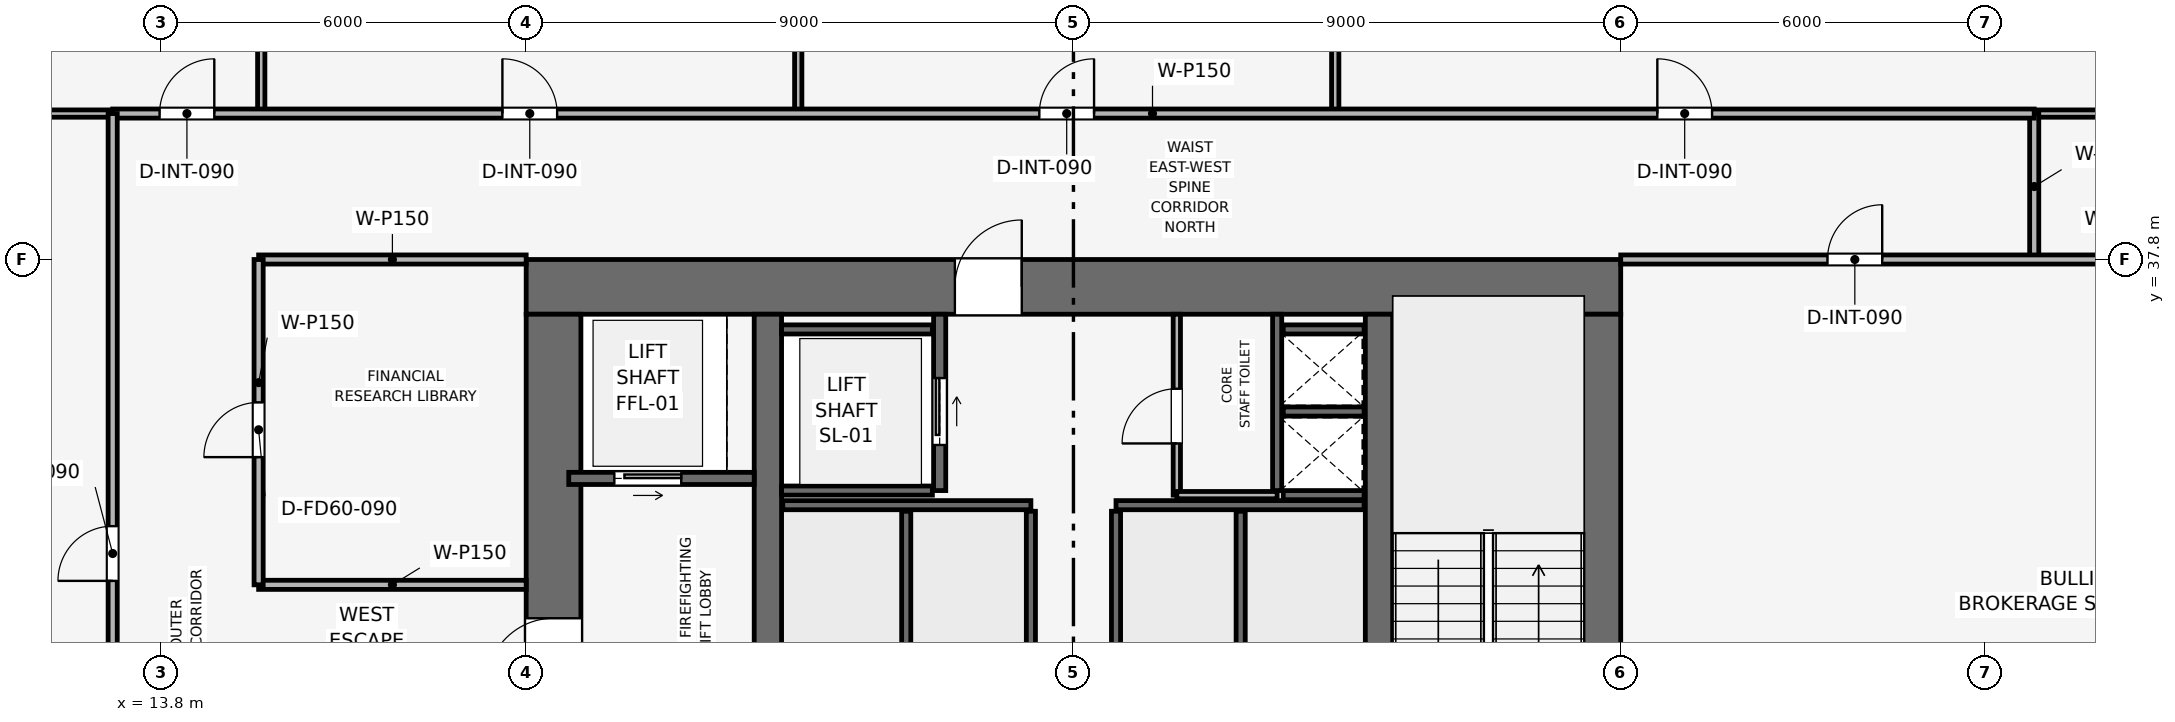
"""IFC4 building model, lengths in metres.
Left out: names, types, materials, properties, quantities, classifications, styles, units other than length and angle.
Written with IfcOpenShell. Run it as: python <this file> out.ifc"""

import sys

from ifc_helpers import new_model, si_unit, direction, frame, frame_2d, origin, place, context, subcontext, project, spatial, rectangle, extrude, element, fill, save


model = new_model("IFC4")
c1 = context("Model", 3, precision=1e-05, world=origin(), true_north=direction((0.0, 1.0)))
c2 = subcontext(c1, "Body", "Model", "MODEL_VIEW")
j1 = project(units=[si_unit("LENGTHUNIT", "METRE"), si_unit("PLANEANGLEUNIT", "RADIAN")], contexts=[c1])
p1 = place(None, origin())
s1 = spatial("IfcSite", under=j1, at=p1, CompositionType="ELEMENT")
p2 = place(p1, origin())
s2 = spatial("IfcBuilding", under=s1, at=p2, CompositionType="ELEMENT")
p3 = place(p2, frame((0.0, 0.0, 183.3)))
s3 = spatial("IfcBuildingStorey", under=s2, at=p3, CompositionType="ELEMENT", Elevation=183.3)
p4 = place(p3, frame((19.8, 37.35, 0.0), z_axis=(0.0, 0.0, 1.0), x_axis=(1.0, 0.0, 0.0)))
e1 = element("IfcWall", 1, at=p4, inside=s3, PredefinedType="SHEAR", context=c2, shape_type="SweptSolid", body=[
    extrude(rectangle(XDim=18.0, YDim=0.9, at=frame_2d((9.0, 0.0))), origin(), (0.0, 0.0, 1.0), 3.75),
])
p5 = place(p4, frame((7.05, 0.0, 0.0)))
e2 = element("IfcOpeningElement", 2, at=p5, cuts=e1, PredefinedType="OPENING", context=c2, shape_type="SweptSolid", body=[
    extrude(rectangle(XDim=1.1, YDim=2.15, at=frame_2d((0.55, 1.075))), frame((0.0, 0.46, 0.0), z_axis=(0.0, -1.0, 0.0), x_axis=(1.0, 0.0, 0.0)), (0.0, 0.0, 1.0), 0.92),
])
p6 = place(p3, frame((20.25, 20.7, 0.0), z_axis=(0.0, 0.0, 1.0), x_axis=(0.0, 1.0, 0.0)))
e3 = element("IfcWall", 3, at=p6, inside=s3, PredefinedType="SHEAR", context=c2, shape_type="SweptSolid", body=[
    extrude(rectangle(XDim=16.2, YDim=0.9, at=frame_2d((8.1, 0.0))), origin(), (0.0, 0.0, 1.0), 3.75),
])
p7 = place(p6, frame((10.1, 0.0, 0.0)))
e4 = element("IfcOpeningElement", 4, at=p7, cuts=e3, PredefinedType="OPENING", context=c2, shape_type="SweptSolid", body=[
    extrude(rectangle(XDim=1.1, YDim=2.15, at=frame_2d((0.55, 1.075))), frame((0.0, 0.46, 0.0), z_axis=(0.0, -1.0, 0.0), x_axis=(1.0, 0.0, 0.0)), (0.0, 0.0, 1.0), 0.92),
])
p8 = place(p3, frame((37.35, 20.7, 0.0), z_axis=(0.0, 0.0, 1.0), x_axis=(0.0, 1.0, 0.0)))
e5 = element("IfcWall", 5, at=p8, inside=s3, PredefinedType="SHEAR", context=c2, shape_type="SweptSolid", body=[
    extrude(rectangle(XDim=16.2, YDim=0.9, at=frame_2d((8.1, 0.0))), origin(), (0.0, 0.0, 1.0), 3.75),
])
p9 = place(p8, frame((4.6, 0.0, 0.0)))
e6 = element("IfcOpeningElement", 6, at=p9, cuts=e5, PredefinedType="OPENING", context=c2, shape_type="SweptSolid", body=[
    extrude(rectangle(XDim=1.1, YDim=2.15, at=frame_2d((0.55, 1.075))), frame((0.0, 0.46, 0.0), z_axis=(0.0, -1.0, 0.0), x_axis=(1.0, 0.0, 0.0)), (0.0, 0.0, 1.0), 0.92),
])
for number, where, z_axis, x_axis in (
    (7, (23.775, 20.7, 0.0), (0.0, 0.0, 1.0), (0.0, 1.0, 0.0)),
    (8, (33.825, 20.7, 0.0), (0.0, 0.0, 1.0), (0.0, 1.0, 0.0)),
):
    element("IfcWall", number, at=place(p3, frame(where, z_axis=z_axis, x_axis=x_axis)), inside=s3, PredefinedType="SHEAR", context=c2, shape_type="SweptSolid", body=[
        extrude(rectangle(XDim=16.2, YDim=0.45, at=frame_2d((8.1, 0.0))), origin(), (0.0, 0.0, 1.0), 3.75),
    ])
p10 = place(p3, frame((32.15, 34.0, 0.0), z_axis=(0.0, 0.0, 1.0), x_axis=(0.0, 1.0, 0.0)))
e9 = element("IfcWall", 9, at=p10, inside=s3, PredefinedType="SHEAR", context=c2, shape_type="SweptSolid", body=[
    extrude(rectangle(XDim=2.9, YDim=0.15, at=frame_2d((1.45, 0.0))), origin(), (0.0, 0.0, 1.0), 3.495),
])
for number, where, z_axis, x_axis in (
    (10, (32.25, 33.925, 0.0), (0.0, 0.0, 1.0), (1.0, 0.0, 0.0)),
    (11, (32.25, 35.3, 0.0), (0.0, 0.0, 1.0), (1.0, 0.0, 0.0)),
):
    element("IfcWall", number, at=place(p3, frame(where, z_axis=z_axis, x_axis=x_axis)), inside=s3, PredefinedType="SHEAR", context=c2, shape_type="SweptSolid", body=[
        extrude(rectangle(XDim=1.33, YDim=0.15, at=frame_2d((0.665, 0.0))), origin(), (0.0, 0.0, 1.0), 3.495),
    ])
p11 = place(p3, frame((20.5, 34.2, 0.0), z_axis=(0.0, 0.0, 1.0), x_axis=(1.0, 0.0, 0.0)))
e12 = element("IfcWall", 12, at=p11, inside=s3, PredefinedType="SHEAR", context=c2, shape_type="SweptSolid", body=[
    extrude(rectangle(XDim=3.05, YDim=0.2, at=frame_2d((1.525, 0.0))), origin(), (0.0, 0.0, 1.0), 3.495),
])
p12 = place(p11, frame((0.75, 0.0, 0.0)))
e13 = element("IfcOpeningElement", 13, at=p12, cuts=e12, PredefinedType="OPENING", context=c2, shape_type="SweptSolid", body=[
    extrude(rectangle(XDim=1.1, YDim=2.15, at=frame_2d((0.55, 1.075))), frame((0.0, 0.11, 0.0), z_axis=(0.0, -1.0, 0.0), x_axis=(1.0, 0.0, 0.0)), (0.0, 0.0, 1.0), 0.22),
])
p13 = place(p3, frame((26.6, 34.0, 0.0), z_axis=(0.0, 0.0, 1.0), x_axis=(0.0, 1.0, 0.0)))
e14 = element("IfcWall", 14, at=p13, inside=s3, PredefinedType="SHEAR", context=c2, shape_type="SweptSolid", body=[
    extrude(rectangle(XDim=2.9, YDim=0.2, at=frame_2d((1.45, 0.0))), origin(), (0.0, 0.0, 1.0), 3.495),
])
p14 = place(p13, frame((0.75, 0.0, 0.0)))
e15 = element("IfcOpeningElement", 15, at=p14, cuts=e14, PredefinedType="OPENING", context=c2, shape_type="SweptSolid", body=[
    extrude(rectangle(XDim=1.1, YDim=2.15, at=frame_2d((0.55, 1.075))), frame((0.0, 0.11, 0.0), z_axis=(0.0, -1.0, 0.0), x_axis=(1.0, 0.0, 0.0)), (0.0, 0.0, 1.0), 0.22),
])
for number, where, z_axis, x_axis in (
    (16, (24.0, 34.0, 0.0), (0.0, 0.0, 1.0), (1.0, 0.0, 0.0)),
    (17, (24.0, 36.65, 0.0), (0.0, 0.0, 1.0), (1.0, 0.0, 0.0)),
):
    element("IfcWall", number, at=place(p3, frame(where, z_axis=z_axis, x_axis=x_axis)), inside=s3, PredefinedType="SHEAR", context=c2, shape_type="SweptSolid", body=[
        extrude(rectangle(XDim=2.48, YDim=0.15, at=frame_2d((1.24, 0.0))), origin(), (0.0, 0.0, 1.0), 3.495),
    ])
p15 = place(p3, frame((32.25, 36.65, 0.0), z_axis=(0.0, 0.0, 1.0), x_axis=(1.0, 0.0, 0.0)))
e18 = element("IfcWall", 18, at=p15, inside=s3, PredefinedType="SHEAR", context=c2, shape_type="SweptSolid", body=[
    extrude(rectangle(XDim=1.33, YDim=0.15, at=frame_2d((0.665, 0.0))), origin(), (0.0, 0.0, 1.0), 3.495),
])
for number, where, z_axis, x_axis in (
    (19, (24.02, 33.76, 0.0), (0.0, 0.0, 1.0), (1.0, 0.0, 0.0)),
    (20, (29.5, 33.76, 0.0), (0.0, 0.0, 1.0), (1.0, 0.0, 0.0)),
):
    element("IfcWall", number, at=place(p3, frame(where, z_axis=z_axis, x_axis=x_axis)), inside=s3, PredefinedType="SHEAR", context=c2, shape_type="SweptSolid", body=[
        extrude(rectangle(XDim=4.08, YDim=0.15, at=frame_2d((2.04, 0.0))), origin(), (0.0, 0.0, 1.0), 3.495),
    ])
for number, where, z_axis, x_axis in (
    (21, (26.05, 31.42, 0.0), (0.0, 0.0, 1.0), (0.0, 1.0, 0.0)),
    (22, (28.1, 31.42, 0.0), (0.0, 0.0, 1.0), (0.0, 1.0, 0.0)),
    (23, (29.5, 31.42, 0.0), (0.0, 0.0, 1.0), (0.0, 1.0, 0.0)),
    (24, (31.55, 31.42, 0.0), (0.0, 0.0, 1.0), (0.0, 1.0, 0.0)),
):
    element("IfcWall", number, at=place(p3, frame(where, z_axis=z_axis, x_axis=x_axis)), inside=s3, PredefinedType="SHEAR", context=c2, shape_type="SweptSolid", body=[
        extrude(rectangle(XDim=2.24, YDim=0.15, at=frame_2d((1.12, 0.0))), origin(), (0.0, 0.0, 1.0), 3.495),
    ])
p16 = place(p3, frame((30.5, 33.925, 0.0), z_axis=(0.0, 0.0, 1.0), x_axis=(0.0, 1.0, 0.0)))
e25 = element("IfcWall", 25, at=p16, inside=s3, PredefinedType="PARTITIONING", context=c2, shape_type="SweptSolid", body=[
    extrude(rectangle(XDim=2.975, YDim=0.12, at=frame_2d((1.487, 0.0))), origin(), (0.0, 0.0, 1.0), 3.495),
])
p17 = place(p16, frame((0.85, 0.0, 0.0)))
e26 = element("IfcOpeningElement", 26, at=p17, cuts=e25, PredefinedType="OPENING", context=c2, shape_type="SweptSolid", body=[
    extrude(rectangle(XDim=0.9, YDim=2.1, at=frame_2d((0.45, 1.05))), frame((0.0, 0.07, 0.0), z_axis=(0.0, -1.0, 0.0), x_axis=(1.0, 0.0, 0.0)), (0.0, 0.0, 1.0), 0.14),
])
p18 = place(p3, frame((30.5, 33.925, 0.0), z_axis=(0.0, 0.0, 1.0), x_axis=(1.0, 0.0, 0.0)))
e27 = element("IfcWall", 27, at=p18, inside=s3, PredefinedType="PARTITIONING", context=c2, shape_type="SweptSolid", body=[
    extrude(rectangle(XDim=1.65, YDim=0.12, at=frame_2d((0.825, 0.0))), origin(), (0.0, 0.0, 1.0), 3.495),
])
p19 = place(p3, frame((15.4, 32.45, 0.0), z_axis=(0.0, 0.0, 1.0), x_axis=(1.0, 0.0, 0.0)))
e28 = element("IfcWall", 28, at=p19, inside=s3, PredefinedType="PARTITIONING", context=c2, shape_type="SweptSolid", body=[
    extrude(rectangle(XDim=4.4, YDim=0.15, at=frame_2d((2.2, 0.0))), origin(), (0.0, 0.0, 1.0), 3.495),
])
p20 = place(p3, frame((15.4, 37.8, 0.0), z_axis=(0.0, 0.0, 1.0), x_axis=(1.0, 0.0, 0.0)))
e29 = element("IfcWall", 29, at=p20, inside=s3, PredefinedType="PARTITIONING", context=c2, shape_type="SweptSolid", body=[
    extrude(rectangle(XDim=4.4, YDim=0.15, at=frame_2d((2.2, 0.0))), origin(), (0.0, 0.0, 1.0), 3.03),
])
p21 = place(p3, frame((15.4, 32.45, 0.0), z_axis=(0.0, 0.0, 1.0), x_axis=(0.0, 1.0, 0.0)))
e30 = element("IfcWall", 30, at=p21, inside=s3, PredefinedType="PARTITIONING", context=c2, shape_type="SweptSolid", body=[
    extrude(rectangle(XDim=5.35, YDim=0.15, at=frame_2d((2.675, 0.0))), origin(), (0.0, 0.0, 1.0), 3.03),
])
p22 = place(p21, frame((2.1, 0.0, 0.0)))
e31 = element("IfcOpeningElement", 31, at=p22, cuts=e30, PredefinedType="OPENING", context=c2, shape_type="SweptSolid", body=[
    extrude(rectangle(XDim=0.9, YDim=2.1, at=frame_2d((0.45, 1.05))), frame((0.0, 0.085, 0.0), z_axis=(0.0, -1.0, 0.0), x_axis=(1.0, 0.0, 0.0)), (0.0, 0.0, 1.0), 0.17),
])
for number, where, z_axis, x_axis in (
    (32, (15.443, 40.2, 0.0), (0.0, 0.0, 1.0), (0.0, 1.0, 0.0)),
    (33, (24.274, 40.2, 0.0), (0.0, 0.0, 1.0), (0.0, 1.0, 0.0)),
    (34, (33.105, 40.2, 0.0), (0.0, 0.0, 1.0), (0.0, 1.0, 0.0)),
):
    element("IfcWall", number, at=place(p3, frame(where, z_axis=z_axis, x_axis=x_axis)), inside=s3, PredefinedType="PARTITIONING", context=c2, shape_type="SweptSolid", body=[
        extrude(rectangle(XDim=12.77, YDim=0.12, at=frame_2d((6.385, 0.0))), origin(), (0.0, 0.0, 1.0), 2.98),
    ])
p23 = place(p3, frame((4.63, 40.2, 0.0), z_axis=(0.0, 0.0, 1.0), x_axis=(1.0, 0.0, 0.0)))
e35 = element("IfcWall", 35, at=p23, inside=s3, PredefinedType="PARTITIONING", context=c2, shape_type="SweptSolid", body=[
    extrude(rectangle(XDim=8.37, YDim=0.12, at=frame_2d((4.185, 0.0))), origin(), (0.0, 0.0, 1.0), 2.98),
])
p24 = place(p3, frame((44.6, 40.2, 0.0), z_axis=(0.0, 0.0, 1.0), x_axis=(1.0, 0.0, 0.0)))
e36 = element("IfcWall", 36, at=p24, inside=s3, PredefinedType="PARTITIONING", context=c2, shape_type="SweptSolid", body=[
    extrude(rectangle(XDim=8.37, YDim=0.12, at=frame_2d((4.185, 0.0))), origin(), (0.0, 0.0, 1.0), 2.98),
])
p25 = place(p3, frame((44.6, 37.8, 0.0), z_axis=(0.0, 0.0, 1.0), x_axis=(0.0, 1.0, 0.0)))
e37 = element("IfcWall", 37, at=p25, inside=s3, PredefinedType="PARTITIONING", context=c2, shape_type="SweptSolid", body=[
    extrude(rectangle(XDim=2.4, YDim=0.15, at=frame_2d((1.2, 0.0))), origin(), (0.0, 0.0, 1.0), 3.495),
])
p26 = place(p3, frame((37.8, 37.8, 0.0), z_axis=(0.0, 0.0, 1.0), x_axis=(1.0, 0.0, 0.0)))
e38 = element("IfcWall", 38, at=p26, inside=s3, PredefinedType="PARTITIONING", context=c2, shape_type="SweptSolid", body=[
    extrude(rectangle(XDim=15.17, YDim=0.15, at=frame_2d((7.585, 0.0))), origin(), (0.0, 0.0, 1.0), 2.98),
])
p27 = place(p26, frame((3.4, 0.0, 0.0)))
e39 = element("IfcOpeningElement", 39, at=p27, cuts=e38, PredefinedType="OPENING", context=c2, shape_type="SweptSolid", body=[
    extrude(rectangle(XDim=0.9, YDim=2.1, at=frame_2d((0.45, 1.05))), frame((0.0, 0.085, 0.0), z_axis=(0.0, -1.0, 0.0), x_axis=(1.0, 0.0, 0.0)), (0.0, 0.0, 1.0), 0.17),
])
p28 = place(p3, frame((13.0, 40.2, 0.0), z_axis=(0.0, 0.0, 1.0), x_axis=(1.0, 0.0, 0.0)))
e40 = element("IfcWall", 40, at=p28, inside=s3, PredefinedType="PARTITIONING", context=c2, shape_type="SweptSolid", body=[
    extrude(rectangle(XDim=31.6, YDim=0.15, at=frame_2d((15.8, 0.0))), origin(), (0.0, 0.0, 1.0), 3.03),
])
p29 = place(p28, frame((0.771, 0.0, 0.0)))
e41 = element("IfcOpeningElement", 41, at=p29, cuts=e40, PredefinedType="OPENING", context=c2, shape_type="SweptSolid", body=[
    extrude(rectangle(XDim=0.9, YDim=2.1, at=frame_2d((0.45, 1.05))), frame((0.0, 0.085, 0.0), z_axis=(0.0, -1.0, 0.0), x_axis=(1.0, 0.0, 0.0)), (0.0, 0.0, 1.0), 0.17),
])
p30 = place(p28, frame((6.409, 0.0, 0.0)))
e42 = element("IfcOpeningElement", 42, at=p30, cuts=e40, PredefinedType="OPENING", context=c2, shape_type="SweptSolid", body=[
    extrude(rectangle(XDim=0.9, YDim=2.1, at=frame_2d((0.45, 1.05))), frame((0.0, 0.085, 0.0), z_axis=(0.0, -1.0, 0.0), x_axis=(1.0, 0.0, 0.0)), (0.0, 0.0, 1.0), 0.17),
])
p31 = place(p28, frame((15.239, 0.0, 0.0)))
e43 = element("IfcOpeningElement", 43, at=p31, cuts=e40, PredefinedType="OPENING", context=c2, shape_type="SweptSolid", body=[
    extrude(rectangle(XDim=0.9, YDim=2.1, at=frame_2d((0.45, 1.05))), frame((0.0, 0.085, 0.0), z_axis=(0.0, -1.0, 0.0), x_axis=(1.0, 0.0, 0.0)), (0.0, 0.0, 1.0), 0.17),
])
p32 = place(p28, frame((25.402, 0.0, 0.0)))
e44 = element("IfcOpeningElement", 44, at=p32, cuts=e40, PredefinedType="OPENING", context=c2, shape_type="SweptSolid", body=[
    extrude(rectangle(XDim=0.9, YDim=2.1, at=frame_2d((0.45, 1.05))), frame((0.0, 0.085, 0.0), z_axis=(0.0, -1.0, 0.0), x_axis=(1.0, 0.0, 0.0)), (0.0, 0.0, 1.0), 0.17),
])
p33 = place(p3, frame((13.0, 17.4, 0.0), z_axis=(0.0, 0.0, 1.0), x_axis=(0.0, 1.0, 0.0)))
e45 = element("IfcWall", 45, at=p33, inside=s3, PredefinedType="PARTITIONING", context=c2, shape_type="SweptSolid", body=[
    extrude(rectangle(XDim=22.8, YDim=0.15, at=frame_2d((11.4, 0.0))), origin(), (0.0, 0.0, 1.0), 3.03),
])
p34 = place(p33, frame((6.115, 0.0, 0.0)))
e46 = element("IfcOpeningElement", 46, at=p34, cuts=e45, PredefinedType="OPENING", context=c2, shape_type="SweptSolid", body=[
    extrude(rectangle(XDim=0.9, YDim=2.1, at=frame_2d((0.45, 1.05))), frame((0.0, 0.085, 0.0), z_axis=(0.0, -1.0, 0.0), x_axis=(1.0, 0.0, 0.0)), (0.0, 0.0, 1.0), 0.17),
])
p35 = place(p33, frame((15.115, 0.0, 0.0)))
e47 = element("IfcOpeningElement", 47, at=p35, cuts=e45, PredefinedType="OPENING", context=c2, shape_type="SweptSolid", body=[
    extrude(rectangle(XDim=0.9, YDim=2.1, at=frame_2d((0.45, 1.05))), frame((0.0, 0.085, 0.0), z_axis=(0.0, -1.0, 0.0), x_axis=(1.0, 0.0, 0.0)), (0.0, 0.0, 1.0), 0.17),
])
p36 = place(p12, origin())
e48 = element("IfcDoor", 48, at=p36, inside=s3, OperationType="SLIDING_TO_RIGHT", PredefinedType="DOOR", context=c2, shape_type="SweptSolid", body=[
    extrude(rectangle(XDim=1.1, YDim=2.15, at=frame_2d((0.55, 1.075))), frame((0.0, 0.025, 0.0), z_axis=(0.0, -1.0, 0.0), x_axis=(1.0, 0.0, 0.0)), (0.0, 0.0, 1.0), 0.05),
])
fill(e13, e48)
p37 = place(p14, origin())
e49 = element("IfcDoor", 49, at=p37, inside=s3, OperationType="SLIDING_TO_RIGHT", PredefinedType="DOOR", context=c2, shape_type="SweptSolid", body=[
    extrude(rectangle(XDim=1.1, YDim=2.15, at=frame_2d((0.55, 1.075))), frame((0.0, 0.025, 0.0), z_axis=(0.0, -1.0, 0.0), x_axis=(1.0, 0.0, 0.0)), (0.0, 0.0, 1.0), 0.05),
])
fill(e15, e49)
p38 = place(p17, origin())
e50 = element("IfcDoor", 50, at=p38, inside=s3, OperationType="SINGLE_SWING_LEFT", PredefinedType="DOOR", context=c2, shape_type="SweptSolid", body=[
    extrude(rectangle(XDim=0.9, YDim=2.1, at=frame_2d((0.45, 1.05))), frame((0.0, 0.025, 0.0), z_axis=(0.0, -1.0, 0.0), x_axis=(1.0, 0.0, 0.0)), (0.0, 0.0, 1.0), 0.05),
])
fill(e26, e50)
p39 = place(p22, origin())
e51 = element("IfcDoor", 51, at=p39, inside=s3, OperationType="SINGLE_SWING_LEFT", PredefinedType="DOOR", context=c2, shape_type="SweptSolid", body=[
    extrude(rectangle(XDim=0.9, YDim=2.1, at=frame_2d((0.45, 1.05))), frame((0.0, 0.025, 0.0), z_axis=(0.0, -1.0, 0.0), x_axis=(1.0, 0.0, 0.0)), (0.0, 0.0, 1.0), 0.05),
])
fill(e31, e51)
p40 = place(p27, origin())
e52 = element("IfcDoor", 52, at=p40, inside=s3, OperationType="SINGLE_SWING_RIGHT", PredefinedType="DOOR", context=c2, shape_type="SweptSolid", body=[
    extrude(rectangle(XDim=0.9, YDim=2.1, at=frame_2d((0.45, 1.05))), frame((0.0, 0.025, 0.0), z_axis=(0.0, -1.0, 0.0), x_axis=(1.0, 0.0, 0.0)), (0.0, 0.0, 1.0), 0.05),
])
fill(e39, e52)
p41 = place(p29, origin())
e53 = element("IfcDoor", 53, at=p41, inside=s3, OperationType="SINGLE_SWING_RIGHT", PredefinedType="DOOR", context=c2, shape_type="SweptSolid", body=[
    extrude(rectangle(XDim=0.9, YDim=2.1, at=frame_2d((0.45, 1.05))), frame((0.0, 0.025, 0.0), z_axis=(0.0, -1.0, 0.0), x_axis=(1.0, 0.0, 0.0)), (0.0, 0.0, 1.0), 0.05),
])
fill(e41, e53)
p42 = place(p30, origin())
e54 = element("IfcDoor", 54, at=p42, inside=s3, OperationType="SINGLE_SWING_LEFT", PredefinedType="DOOR", context=c2, shape_type="SweptSolid", body=[
    extrude(rectangle(XDim=0.9, YDim=2.1, at=frame_2d((0.45, 1.05))), frame((0.0, 0.025, 0.0), z_axis=(0.0, -1.0, 0.0), x_axis=(1.0, 0.0, 0.0)), (0.0, 0.0, 1.0), 0.05),
])
fill(e42, e54)
p43 = place(p31, origin())
e55 = element("IfcDoor", 55, at=p43, inside=s3, OperationType="SINGLE_SWING_RIGHT", PredefinedType="DOOR", context=c2, shape_type="SweptSolid", body=[
    extrude(rectangle(XDim=0.9, YDim=2.1, at=frame_2d((0.45, 1.05))), frame((0.0, 0.025, 0.0), z_axis=(0.0, -1.0, 0.0), x_axis=(1.0, 0.0, 0.0)), (0.0, 0.0, 1.0), 0.05),
])
fill(e43, e55)
p44 = place(p32, origin())
e56 = element("IfcDoor", 56, at=p44, inside=s3, OperationType="SINGLE_SWING_LEFT", PredefinedType="DOOR", context=c2, shape_type="SweptSolid", body=[
    extrude(rectangle(XDim=0.9, YDim=2.1, at=frame_2d((0.45, 1.05))), frame((0.0, 0.025, 0.0), z_axis=(0.0, -1.0, 0.0), x_axis=(1.0, 0.0, 0.0)), (0.0, 0.0, 1.0), 0.05),
])
fill(e44, e56)
p45 = place(p35, origin())
e57 = element("IfcDoor", 57, at=p45, inside=s3, OperationType="SINGLE_SWING_LEFT", PredefinedType="DOOR", context=c2, shape_type="SweptSolid", body=[
    extrude(rectangle(XDim=0.9, YDim=2.1, at=frame_2d((0.45, 1.05))), frame((0.0, 0.025, 0.0), z_axis=(0.0, -1.0, 0.0), x_axis=(1.0, 0.0, 0.0)), (0.0, 0.0, 1.0), 0.05),
])
fill(e47, e57)
p46 = place(p7, origin())
e58 = element("IfcDoor", 58, at=p46, inside=s3, OperationType="SINGLE_SWING_LEFT", PredefinedType="DOOR", context=c2, shape_type="SweptSolid", body=[
    extrude(rectangle(XDim=1.1, YDim=2.15, at=frame_2d((0.55, 1.075))), frame((0.0, 0.025, 0.0), z_axis=(0.0, -1.0, 0.0), x_axis=(1.0, 0.0, 0.0)), (0.0, 0.0, 1.0), 0.05),
])
fill(e4, e58)
p47 = place(p5, origin())
e59 = element("IfcDoor", 59, at=p47, inside=s3, OperationType="SINGLE_SWING_RIGHT", PredefinedType="DOOR", context=c2, shape_type="SweptSolid", body=[
    extrude(rectangle(XDim=1.1, YDim=2.15, at=frame_2d((0.55, 1.075))), frame((0.0, 0.025, 0.0), z_axis=(0.0, -1.0, 0.0), x_axis=(1.0, 0.0, 0.0)), (0.0, 0.0, 1.0), 0.05),
])
fill(e2, e59)
save(model, sys.argv[1])
